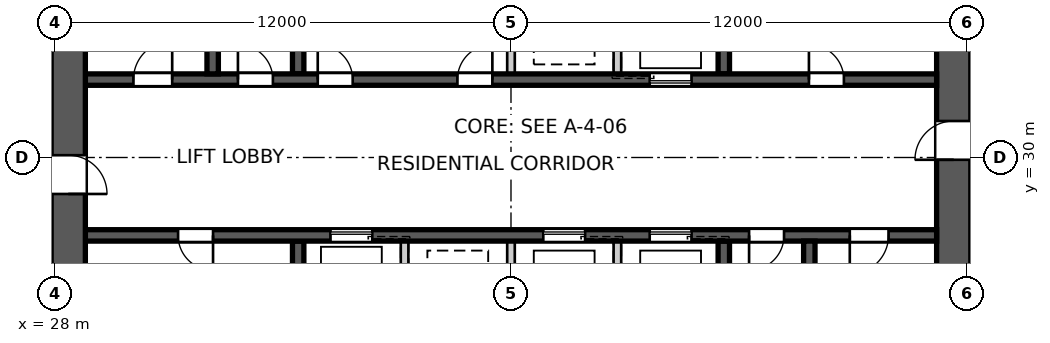
"""IFC4 building model, lengths in metres.
Left out: names, types, materials, properties, quantities, classifications, styles, units other than length and angle.
Written with IfcOpenShell. Run it as: python <this file> out.ifc"""

import sys

from ifc_helpers import new_model, si_unit, direction, frame, frame_2d, origin, place, context, subcontext, project, spatial, polyline, rectangle, outline, extrude, element, fill, save


model = new_model("IFC4")
c1 = context("Model", 3, precision=1e-05, world=origin(), true_north=direction((0.0, 1.0)))
c2 = subcontext(c1, "Body", "Model", "MODEL_VIEW")
j1 = project(units=[si_unit("LENGTHUNIT", "METRE"), si_unit("PLANEANGLEUNIT", "RADIAN")], contexts=[c1])
p1 = place(None, origin())
s1 = spatial("IfcSite", under=j1, at=p1, CompositionType="ELEMENT")
p2 = place(p1, origin())
s2 = spatial("IfcBuilding", under=s1, at=p2, CompositionType="ELEMENT")
p3 = place(p2, frame((0.0, 0.0, 167.6)))
s3 = spatial("IfcBuildingStorey", under=s2, at=p3, CompositionType="ELEMENT", Elevation=167.6)
p4 = place(p3, frame((51.65, 18.8, 0.0), z_axis=(0.0, 0.0, 1.0), x_axis=(0.0, 1.0, 0.0)))
e1 = element("IfcWall", 1, at=p4, inside=s3, PredefinedType="SHEAR", context=c2, shape_type="SweptSolid", body=[
    extrude(outline(polyline([(0.0, -0.45), (22.4, -0.45), (22.4, -0.025), (22.85, -0.025), (22.85, 0.025), (22.4, 0.025), (22.4, 0.45), (0.0, 0.45), (0.0, 0.025), (-0.45, 0.025), (-0.45, -0.025), (0.0, -0.025), (0.0, -0.45)])), origin(), (0.0, 0.0, 1.0), 3.4),
])
p5 = place(p4, frame((11.14, 0.0, 0.0)))
e2 = element("IfcOpeningElement", 2, at=p5, cuts=e1, PredefinedType="OPENING", context=c2, shape_type="SweptSolid", body=[
    extrude(rectangle(XDim=1.02, YDim=2.4, at=frame_2d((0.51, 1.2))), frame((0.0, 0.46, 0.0), z_axis=(0.0, -1.0, 0.0), x_axis=(1.0, 0.0, 0.0)), (0.0, 0.0, 1.0), 0.92),
])
p6 = place(p3, frame((28.35, 41.2, 0.0), z_axis=(0.0, 0.0, 1.0), x_axis=(0.0, -1.0, 0.0)))
e3 = element("IfcWall", 3, at=p6, inside=s3, PredefinedType="SHEAR", context=c2, shape_type="SweptSolid", body=[
    extrude(outline(polyline([(0.0, -0.45), (22.4, -0.45), (22.4, -0.025), (22.85, -0.025), (22.85, 0.025), (22.4, 0.025), (22.4, 0.45), (0.0, 0.45), (0.0, 0.025), (-0.45, 0.025), (-0.45, -0.025), (0.0, -0.025), (0.0, -0.45)])), origin(), (0.0, 0.0, 1.0), 3.4),
])
p7 = place(p6, frame((11.14, 0.0, 0.0)))
e4 = element("IfcOpeningElement", 4, at=p7, cuts=e3, PredefinedType="OPENING", context=c2, shape_type="SweptSolid", body=[
    extrude(rectangle(XDim=1.02, YDim=2.4, at=frame_2d((0.51, 1.2))), frame((0.0, 0.46, 0.0), z_axis=(0.0, -1.0, 0.0), x_axis=(1.0, 0.0, 0.0)), (0.0, 0.0, 1.0), 0.92),
])
p8 = place(p3, frame((28.8, 32.05, 0.0), z_axis=(0.0, 0.0, 1.0), x_axis=(1.0, 0.0, 0.0)))
e5 = element("IfcWall", 5, at=p8, inside=s3, PredefinedType="SHEAR", context=c2, shape_type="SweptSolid", body=[
    extrude(rectangle(XDim=22.4, YDim=0.3, at=frame_2d((11.2, 0.0))), origin(), (0.0, 0.0, 1.0), 3.4),
])
p9 = place(p8, frame((19.04, 0.0, 0.0)))
e6 = element("IfcOpeningElement", 6, at=p9, cuts=e5, PredefinedType="OPENING", context=c2, shape_type="SweptSolid", body=[
    extrude(rectangle(XDim=0.92, YDim=2.1, at=frame_2d((0.46, 1.05))), frame((0.0, 0.16, 0.0), z_axis=(0.0, -1.0, 0.0), x_axis=(1.0, 0.0, 0.0)), (0.0, 0.0, 1.0), 0.32),
])
p10 = place(p8, frame((1.265, 0.0, 0.0)))
e7 = element("IfcOpeningElement", 7, at=p10, cuts=e5, PredefinedType="OPENING", context=c2, shape_type="SweptSolid", body=[
    extrude(rectangle(XDim=1.02, YDim=2.1, at=frame_2d((0.51, 1.05))), frame((0.0, 0.16, 0.0), z_axis=(0.0, -1.0, 0.0), x_axis=(1.0, 0.0, 0.0)), (0.0, 0.0, 1.0), 0.32),
])
p11 = place(p8, frame((4.015, 0.0, 0.0)))
e8 = element("IfcOpeningElement", 8, at=p11, cuts=e5, PredefinedType="OPENING", context=c2, shape_type="SweptSolid", body=[
    extrude(rectangle(XDim=0.92, YDim=2.1, at=frame_2d((0.46, 1.05))), frame((0.0, 0.16, 0.0), z_axis=(0.0, -1.0, 0.0), x_axis=(1.0, 0.0, 0.0)), (0.0, 0.0, 1.0), 0.32),
])
p12 = place(p8, frame((6.115, 0.0, 0.0)))
e9 = element("IfcOpeningElement", 9, at=p12, cuts=e5, PredefinedType="OPENING", context=c2, shape_type="SweptSolid", body=[
    extrude(rectangle(XDim=0.92, YDim=2.1, at=frame_2d((0.46, 1.05))), frame((0.0, 0.16, 0.0), z_axis=(0.0, -1.0, 0.0), x_axis=(1.0, 0.0, 0.0)), (0.0, 0.0, 1.0), 0.32),
])
p13 = place(p8, frame((9.79, 0.0, 0.0)))
e10 = element("IfcOpeningElement", 10, at=p13, cuts=e5, PredefinedType="OPENING", context=c2, shape_type="SweptSolid", body=[
    extrude(rectangle(XDim=0.92, YDim=2.1, at=frame_2d((0.46, 1.05))), frame((0.0, 0.16, 0.0), z_axis=(0.0, -1.0, 0.0), x_axis=(1.0, 0.0, 0.0)), (0.0, 0.0, 1.0), 0.32),
])
p14 = place(p8, frame((14.85, 0.0, 0.0)))
e11 = element("IfcOpeningElement", 11, at=p14, cuts=e5, PredefinedType="OPENING", context=c2, shape_type="SweptSolid", body=[
    extrude(rectangle(XDim=1.1, YDim=2.1, at=frame_2d((0.55, 1.05))), frame((0.0, 0.16, 0.0), z_axis=(0.0, -1.0, 0.0), x_axis=(1.0, 0.0, 0.0)), (0.0, 0.0, 1.0), 0.32),
])
p15 = place(p3, frame((51.2, 27.95, 0.0), z_axis=(0.0, 0.0, 1.0), x_axis=(-1.0, 0.0, 0.0)))
e12 = element("IfcWall", 12, at=p15, inside=s3, PredefinedType="SHEAR", context=c2, shape_type="SweptSolid", body=[
    extrude(rectangle(XDim=22.4, YDim=0.3, at=frame_2d((11.2, 0.0))), origin(), (0.0, 0.0, 1.0), 3.4),
])
p16 = place(p15, frame((19.04, 0.0, 0.0)))
e13 = element("IfcOpeningElement", 13, at=p16, cuts=e12, PredefinedType="OPENING", context=c2, shape_type="SweptSolid", body=[
    extrude(rectangle(XDim=0.92, YDim=2.1, at=frame_2d((0.46, 1.05))), frame((0.0, 0.16, 0.0), z_axis=(0.0, -1.0, 0.0), x_axis=(1.0, 0.0, 0.0)), (0.0, 0.0, 1.0), 0.32),
])
p17 = place(p15, frame((1.265, 0.0, 0.0)))
e14 = element("IfcOpeningElement", 14, at=p17, cuts=e12, PredefinedType="OPENING", context=c2, shape_type="SweptSolid", body=[
    extrude(rectangle(XDim=1.02, YDim=2.1, at=frame_2d((0.51, 1.05))), frame((0.0, 0.16, 0.0), z_axis=(0.0, -1.0, 0.0), x_axis=(1.0, 0.0, 0.0)), (0.0, 0.0, 1.0), 0.32),
])
p18 = place(p15, frame((4.015, 0.0, 0.0)))
e15 = element("IfcOpeningElement", 15, at=p18, cuts=e12, PredefinedType="OPENING", context=c2, shape_type="SweptSolid", body=[
    extrude(rectangle(XDim=0.92, YDim=2.1, at=frame_2d((0.46, 1.05))), frame((0.0, 0.16, 0.0), z_axis=(0.0, -1.0, 0.0), x_axis=(1.0, 0.0, 0.0)), (0.0, 0.0, 1.0), 0.32),
])
p19 = place(p15, frame((6.45, 0.0, 0.0)))
e16 = element("IfcOpeningElement", 16, at=p19, cuts=e12, PredefinedType="OPENING", context=c2, shape_type="SweptSolid", body=[
    extrude(rectangle(XDim=1.1, YDim=2.1, at=frame_2d((0.55, 1.05))), frame((0.0, 0.16, 0.0), z_axis=(0.0, -1.0, 0.0), x_axis=(1.0, 0.0, 0.0)), (0.0, 0.0, 1.0), 0.32),
])
p20 = place(p15, frame((9.25, 0.0, 0.0)))
e17 = element("IfcOpeningElement", 17, at=p20, cuts=e12, PredefinedType="OPENING", context=c2, shape_type="SweptSolid", body=[
    extrude(rectangle(XDim=1.1, YDim=2.1, at=frame_2d((0.55, 1.05))), frame((0.0, 0.16, 0.0), z_axis=(0.0, -1.0, 0.0), x_axis=(1.0, 0.0, 0.0)), (0.0, 0.0, 1.0), 0.32),
])
p21 = place(p15, frame((14.85, 0.0, 0.0)))
e18 = element("IfcOpeningElement", 18, at=p21, cuts=e12, PredefinedType="OPENING", context=c2, shape_type="SweptSolid", body=[
    extrude(rectangle(XDim=1.1, YDim=2.1, at=frame_2d((0.55, 1.05))), frame((0.0, 0.16, 0.0), z_axis=(0.0, -1.0, 0.0), x_axis=(1.0, 0.0, 0.0)), (0.0, 0.0, 1.0), 0.32),
])
for number, where, z_axis, x_axis in (
    (19, (34.4, 32.2, 0.0), (0.0, 0.0, 1.0), (0.0, 1.0, 0.0)),
    (20, (45.6, 27.8, 0.0), (0.0, 0.0, 1.0), (0.0, -1.0, 0.0)),
):
    element("IfcWall", number, at=place(p3, frame(where, z_axis=z_axis, x_axis=x_axis)), inside=s3, PredefinedType="SHEAR", context=c2, shape_type="SweptSolid", body=[
        extrude(rectangle(XDim=2.8, YDim=0.3, at=frame_2d((1.4, 0.0))), origin(), (0.0, 0.0, 1.0), 3.4),
    ])
for number, where, z_axis, x_axis in (
    (21, (42.8, 27.8, 0.0), (0.0, 0.0, 1.0), (0.0, -1.0, 0.0)),
    (22, (40.0, 32.2, 0.0), (0.0, 0.0, 1.0), (0.0, 1.0, 0.0)),
    (23, (40.0, 27.8, 0.0), (0.0, 0.0, 1.0), (0.0, -1.0, 0.0)),
    (24, (42.8, 32.2, 0.0), (0.0, 0.0, 1.0), (0.0, 1.0, 0.0)),
    (25, (37.2, 27.8, 0.0), (0.0, 0.0, 1.0), (0.0, -1.0, 0.0)),
):
    element("IfcWall", number, at=place(p3, frame(where, z_axis=z_axis, x_axis=x_axis)), inside=s3, PredefinedType="SOLIDWALL", context=c2, shape_type="SweptSolid", body=[
        extrude(rectangle(XDim=2.8, YDim=0.2, at=frame_2d((1.4, 0.0))), origin(), (0.0, 0.0, 1.0), 3.4),
    ])
for number, where, z_axis, x_axis in (
    (26, (45.6, 32.2, 0.0), (0.0, 0.0, 1.0), (0.0, 1.0, 0.0)),
    (27, (34.4, 27.8, 0.0), (0.0, 0.0, 1.0), (0.0, -1.0, 0.0)),
):
    element("IfcWall", number, at=place(p3, frame(where, z_axis=z_axis, x_axis=x_axis)), inside=s3, PredefinedType="SHEAR", context=c2, shape_type="SweptSolid", body=[
        extrude(rectangle(XDim=2.8, YDim=0.3, at=frame_2d((1.4, 0.0))), origin(), (0.0, 0.0, 1.0), 3.4),
    ])
for number, where, z_axis, x_axis in (
    (28, (32.15, 32.2, 0.0), (0.0, 0.0, 1.0), (0.0, 1.0, 0.0)),
    (29, (47.85, 27.8, 0.0), (0.0, 0.0, 1.0), (0.0, -1.0, 0.0)),
):
    element("IfcWall", number, at=place(p3, frame(where, z_axis=z_axis, x_axis=x_axis)), inside=s3, PredefinedType="SHEAR", context=c2, shape_type="SweptSolid", body=[
        extrude(rectangle(XDim=7.7, YDim=0.3, at=frame_2d((3.85, 0.0))), origin(), (0.0, 0.0, 1.0), 3.4),
    ])
p22 = place(p9, origin())
e30 = element("IfcDoor", 30, at=p22, inside=s3, OperationType="SINGLE_SWING_LEFT", PredefinedType="DOOR", context=c2, shape_type="SweptSolid", body=[
    extrude(rectangle(XDim=0.92, YDim=2.1, at=frame_2d((0.46, 1.05))), frame((0.0, 0.025, 0.0), z_axis=(0.0, -1.0, 0.0), x_axis=(1.0, 0.0, 0.0)), (0.0, 0.0, 1.0), 0.05),
])
fill(e6, e30)
p23 = place(p16, origin())
e31 = element("IfcDoor", 31, at=p23, inside=s3, OperationType="SINGLE_SWING_LEFT", PredefinedType="DOOR", context=c2, shape_type="SweptSolid", body=[
    extrude(rectangle(XDim=0.92, YDim=2.1, at=frame_2d((0.46, 1.05))), frame((0.0, 0.025, 0.0), z_axis=(0.0, -1.0, 0.0), x_axis=(1.0, 0.0, 0.0)), (0.0, 0.0, 1.0), 0.05),
])
fill(e13, e31)
p24 = place(p17, origin())
e32 = element("IfcDoor", 32, at=p24, inside=s3, OperationType="SINGLE_SWING_RIGHT", PredefinedType="DOOR", context=c2, shape_type="SweptSolid", body=[
    extrude(rectangle(XDim=1.02, YDim=2.1, at=frame_2d((0.51, 1.05))), frame((0.0, 0.025, 0.0), z_axis=(0.0, -1.0, 0.0), x_axis=(1.0, 0.0, 0.0)), (0.0, 0.0, 1.0), 0.05),
])
fill(e14, e32)
p25 = place(p10, origin())
e33 = element("IfcDoor", 33, at=p25, inside=s3, OperationType="SINGLE_SWING_RIGHT", PredefinedType="DOOR", context=c2, shape_type="SweptSolid", body=[
    extrude(rectangle(XDim=1.02, YDim=2.1, at=frame_2d((0.51, 1.05))), frame((0.0, 0.025, 0.0), z_axis=(0.0, -1.0, 0.0), x_axis=(1.0, 0.0, 0.0)), (0.0, 0.0, 1.0), 0.05),
])
fill(e7, e33)
p26 = place(p11, origin())
e34 = element("IfcDoor", 34, at=p26, inside=s3, OperationType="SINGLE_SWING_LEFT", PredefinedType="DOOR", context=c2, shape_type="SweptSolid", body=[
    extrude(rectangle(XDim=0.92, YDim=2.1, at=frame_2d((0.46, 1.05))), frame((0.0, 0.025, 0.0), z_axis=(0.0, -1.0, 0.0), x_axis=(1.0, 0.0, 0.0)), (0.0, 0.0, 1.0), 0.05),
])
fill(e8, e34)
p27 = place(p18, origin())
e35 = element("IfcDoor", 35, at=p27, inside=s3, OperationType="SINGLE_SWING_RIGHT", PredefinedType="DOOR", context=c2, shape_type="SweptSolid", body=[
    extrude(rectangle(XDim=0.92, YDim=2.1, at=frame_2d((0.46, 1.05))), frame((0.0, 0.025, 0.0), z_axis=(0.0, -1.0, 0.0), x_axis=(1.0, 0.0, 0.0)), (0.0, 0.0, 1.0), 0.05),
])
fill(e15, e35)
p28 = place(p12, origin())
e36 = element("IfcDoor", 36, at=p28, inside=s3, OperationType="SINGLE_SWING_LEFT", PredefinedType="DOOR", context=c2, shape_type="SweptSolid", body=[
    extrude(rectangle(XDim=0.92, YDim=2.1, at=frame_2d((0.46, 1.05))), frame((0.0, 0.025, 0.0), z_axis=(0.0, -1.0, 0.0), x_axis=(1.0, 0.0, 0.0)), (0.0, 0.0, 1.0), 0.05),
])
fill(e9, e36)
p29 = place(p13, origin())
e37 = element("IfcDoor", 37, at=p29, inside=s3, OperationType="SINGLE_SWING_RIGHT", PredefinedType="DOOR", context=c2, shape_type="SweptSolid", body=[
    extrude(rectangle(XDim=0.92, YDim=2.1, at=frame_2d((0.46, 1.05))), frame((0.0, 0.025, 0.0), z_axis=(0.0, -1.0, 0.0), x_axis=(1.0, 0.0, 0.0)), (0.0, 0.0, 1.0), 0.05),
])
fill(e10, e37)
p30 = place(p5, origin())
e38 = element("IfcDoor", 38, at=p30, inside=s3, OperationType="SINGLE_SWING_LEFT", PredefinedType="DOOR", context=c2, shape_type="SweptSolid", body=[
    extrude(rectangle(XDim=1.02, YDim=2.4, at=frame_2d((0.51, 1.2))), frame((0.0, 0.025, 0.0), z_axis=(0.0, -1.0, 0.0), x_axis=(1.0, 0.0, 0.0)), (0.0, 0.0, 1.0), 0.05),
])
fill(e2, e38)
p31 = place(p7, origin())
e39 = element("IfcDoor", 39, at=p31, inside=s3, OperationType="SINGLE_SWING_RIGHT", PredefinedType="DOOR", context=c2, shape_type="SweptSolid", body=[
    extrude(rectangle(XDim=1.02, YDim=2.4, at=frame_2d((0.51, 1.2))), frame((0.0, 0.025, 0.0), z_axis=(0.0, -1.0, 0.0), x_axis=(1.0, 0.0, 0.0)), (0.0, 0.0, 1.0), 0.05),
])
fill(e4, e39)
p32 = place(p19, origin())
e40 = element("IfcDoor", 40, at=p32, inside=s3, OperationType="SLIDING_TO_LEFT", PredefinedType="DOOR", context=c2, shape_type="SweptSolid", body=[
    extrude(rectangle(XDim=1.1, YDim=2.1, at=frame_2d((0.55, 1.05))), frame((0.0, 0.025, 0.0), z_axis=(0.0, -1.0, 0.0), x_axis=(1.0, 0.0, 0.0)), (0.0, 0.0, 1.0), 0.05),
])
fill(e16, e40)
p33 = place(p20, origin())
e41 = element("IfcDoor", 41, at=p33, inside=s3, OperationType="SLIDING_TO_LEFT", PredefinedType="DOOR", context=c2, shape_type="SweptSolid", body=[
    extrude(rectangle(XDim=1.1, YDim=2.1, at=frame_2d((0.55, 1.05))), frame((0.0, 0.025, 0.0), z_axis=(0.0, -1.0, 0.0), x_axis=(1.0, 0.0, 0.0)), (0.0, 0.0, 1.0), 0.05),
])
fill(e17, e41)
p34 = place(p14, origin())
e42 = element("IfcDoor", 42, at=p34, inside=s3, OperationType="SLIDING_TO_LEFT", PredefinedType="DOOR", context=c2, shape_type="SweptSolid", body=[
    extrude(rectangle(XDim=1.1, YDim=2.1, at=frame_2d((0.55, 1.05))), frame((0.0, 0.025, 0.0), z_axis=(0.0, -1.0, 0.0), x_axis=(1.0, 0.0, 0.0)), (0.0, 0.0, 1.0), 0.05),
])
fill(e11, e42)
p35 = place(p21, origin())
e43 = element("IfcDoor", 43, at=p35, inside=s3, OperationType="SLIDING_TO_LEFT", PredefinedType="DOOR", context=c2, shape_type="SweptSolid", body=[
    extrude(rectangle(XDim=1.1, YDim=2.1, at=frame_2d((0.55, 1.05))), frame((0.0, 0.025, 0.0), z_axis=(0.0, -1.0, 0.0), x_axis=(1.0, 0.0, 0.0)), (0.0, 0.0, 1.0), 0.05),
])
fill(e18, e43)
save(model, sys.argv[1])
